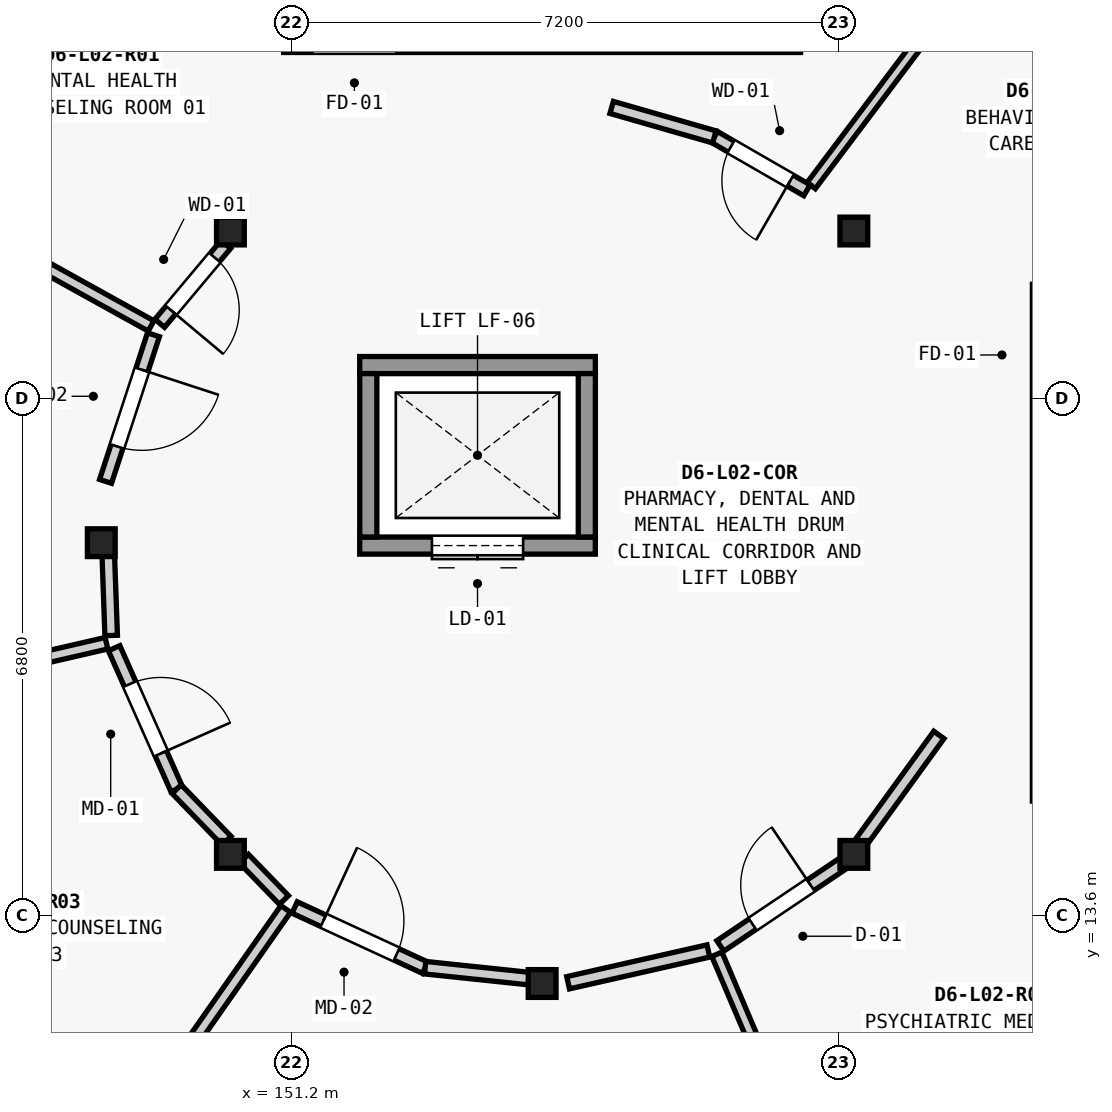
"""IFC4 building model, lengths in metres.
Left out: names, types, materials, properties, quantities, classifications, styles, units other than length and angle.
Written with IfcOpenShell. Run it as: python <this file> out.ifc"""

import sys

from ifc_helpers import new_model, si_unit, direction, frame, frame_2d, origin, origin_2d, place, context, subcontext, project, spatial, rectangle, extrude, element, fill, save


model = new_model("IFC4")
c1 = context("Model", 3, precision=1e-05, world=origin(), true_north=direction((0.0, 1.0)))
c2 = subcontext(c1, "Body", "Model", "MODEL_VIEW")
j1 = project(units=[si_unit("LENGTHUNIT", "METRE"), si_unit("PLANEANGLEUNIT", "RADIAN")], contexts=[c1])
p1 = place(None, origin())
s1 = spatial("IfcSite", under=j1, at=p1, CompositionType="ELEMENT")
p2 = place(p1, origin())
s2 = spatial("IfcBuilding", under=s1, at=p2, CompositionType="ELEMENT")
p3 = place(p2, frame((0.0, 0.0, 8.75)))
s3 = spatial("IfcBuildingStorey", under=s2, at=p3, CompositionType="ELEMENT", Elevation=8.75)
for number, where, z_axis, x_axis in (
    (1, (158.601, 22.601, 0.0), (0.0, 0.0, 1.0), (1.0, 0.0, 0.0)),
    (2, (150.399, 22.601, 0.0), (0.0, 0.0, 1.0), (1.0, 0.0, 0.0)),
    (3, (148.7, 18.5, 0.0), (0.0, 0.0, 1.0), (1.0, 0.0, 0.0)),
    (4, (150.399, 14.399, 0.0), (0.0, 0.0, 1.0), (1.0, 0.0, 0.0)),
    (5, (154.5, 12.7, 0.0), (0.0, 0.0, 1.0), (1.0, 0.0, 0.0)),
    (6, (158.601, 14.399, 0.0), (0.0, 0.0, 1.0), (1.0, 0.0, 0.0)),
):
    element("IfcColumn", number, at=place(p3, frame(where, z_axis=z_axis, x_axis=x_axis)), inside=s3, PredefinedType="COLUMN", context=c2, shape_type="SweptSolid", body=[
        extrude(rectangle(XDim=0.365, YDim=0.365, at=origin_2d()), origin(), (0.0, 0.0, 1.0), 4.2),
    ])
p4 = place(p3, frame((152.1, 18.462, 0.0), z_axis=(0.0, 0.0, 1.0), x_axis=(1.0, 0.0, 0.0)))
e7 = element("IfcWall", 7, at=p4, inside=s3, PredefinedType="SHEAR", context=c2, shape_type="SweptSolid", body=[
    extrude(rectangle(XDim=3.1, YDim=0.225, at=frame_2d((1.55, 0.0))), origin(), (0.0, 0.0, 1.0), 3.96),
])
p5 = place(p4, frame((0.95, 0.0, 0.0)))
e8 = element("IfcOpeningElement", 8, at=p5, cuts=e7, PredefinedType="OPENING", context=c2, shape_type="SweptSolid", body=[
    extrude(rectangle(XDim=1.2, YDim=2.2, at=frame_2d((0.6, 1.1))), frame((0.0, 0.123, 0.0), z_axis=(0.0, -1.0, 0.0), x_axis=(1.0, 0.0, 0.0)), (0.0, 0.0, 1.0), 0.245),
])
p6 = place(p3, frame((152.1, 20.837, 0.0), z_axis=(0.0, 0.0, 1.0), x_axis=(1.0, 0.0, 0.0)))
e9 = element("IfcWall", 9, at=p6, inside=s3, PredefinedType="SHEAR", context=c2, shape_type="SweptSolid", body=[
    extrude(rectangle(XDim=3.1, YDim=0.225, at=frame_2d((1.55, 0.0))), origin(), (0.0, 0.0, 1.0), 3.96),
])
for number, where, z_axis, x_axis in (
    (10, (152.213, 18.575, 0.0), (0.0, 0.0, 1.0), (0.0, 1.0, 0.0)),
    (11, (155.088, 18.575, 0.0), (0.0, 0.0, 1.0), (0.0, 1.0, 0.0)),
):
    element("IfcWall", number, at=place(p3, frame(where, z_axis=z_axis, x_axis=x_axis)), inside=s3, PredefinedType="SHEAR", context=c2, shape_type="SweptSolid", body=[
        extrude(rectangle(XDim=2.15, YDim=0.225, at=frame_2d((1.075, 0.0))), origin(), (0.0, 0.0, 1.0), 3.96),
    ])
p7 = place(p3, frame((149.355, 21.352, 0.0), z_axis=(0.0, 0.0, 1.0), x_axis=(-0.874634926541, 0.484782162703, 0.0)))
e12 = element("IfcWall", 12, at=p7, inside=s3, PredefinedType="PARTITIONING", context=c2, shape_type="SweptSolid", body=[
    extrude(rectangle(XDim=4.866, YDim=0.155, at=frame_2d((2.433, 0.0))), origin(), (0.0, 0.0, 1.0), 3.279),
])
p8 = place(p3, frame((148.768, 17.177, 0.0), z_axis=(0.0, 0.0, 1.0), x_axis=(-0.974350778181, -0.225034577472, 0.0)))
e13 = element("IfcWall", 13, at=p8, inside=s3, PredefinedType="PARTITIONING", context=c2, shape_type="SweptSolid", body=[
    extrude(rectangle(XDim=4.889, YDim=0.155, at=frame_2d((2.444, 0.0))), origin(), (0.0, 0.0, 1.0), 3.279),
])
p9 = place(p3, frame((151.126, 13.681, 0.0), z_axis=(0.0, 0.0, 1.0), x_axis=(-0.573579487823, -0.819149907617, 0.0)))
e14 = element("IfcWall", 14, at=p9, inside=s3, PredefinedType="PARTITIONING", context=c2, shape_type="SweptSolid", body=[
    extrude(rectangle(XDim=4.895, YDim=0.155, at=frame_2d((2.448, 0.0))), origin(), (0.0, 0.0, 1.0), 3.279),
])
p10 = place(p3, frame((156.799, 13.085, 0.0), z_axis=(0.0, 0.0, 1.0), x_axis=(0.390680175244, -0.920526480157, 0.0)))
e15 = element("IfcWall", 15, at=p10, inside=s3, PredefinedType="PARTITIONING", context=c2, shape_type="SweptSolid", body=[
    extrude(rectangle(XDim=4.907, YDim=0.145, at=frame_2d((2.453, 0.0))), origin(), (0.0, 0.0, 1.0), 3.279),
])
p11 = place(p3, frame((158.04, 23.198, 0.0), z_axis=(0.0, 0.0, 1.0), x_axis=(0.601809953338, 0.798639330401, 0.0)))
e16 = element("IfcWall", 16, at=p11, inside=s3, PredefinedType="PLUMBINGWALL", context=c2, shape_type="SweptSolid", body=[
    extrude(rectangle(XDim=4.873, YDim=0.135, at=frame_2d((2.437, 0.0))), origin(), (0.0, 0.0, 1.0), 3.279),
])
p12 = place(p3, frame((150.338, 22.424, 0.0), z_axis=(0.0, 0.0, 1.0), x_axis=(-0.64220553528, -0.766532484931, 0.0)))
e17 = element("IfcWall", 17, at=p12, inside=s3, PredefinedType="PARTITIONING", context=c2, shape_type="SweptSolid", body=[
    extrude(rectangle(XDim=1.353, YDim=0.165, at=frame_2d((0.677, 0.0))), origin(), (0.0, 0.0, 1.0), 3.279),
])
p13 = place(p12, frame((0.226, 0.0, 0.0)))
e18 = element("IfcOpeningElement", 18, at=p13, cuts=e17, PredefinedType="OPENING", context=c2, shape_type="SweptSolid", body=[
    extrude(rectangle(XDim=0.9, YDim=2.1, at=frame_2d((0.45, 1.05))), frame((0.0, 0.093, 0.0), z_axis=(0.0, -1.0, 0.0), x_axis=(1.0, 0.0, 0.0)), (0.0, 0.0, 1.0), 0.185),
])
p14 = place(p3, frame((149.386, 21.236, 0.0), z_axis=(0.0, 0.0, 1.0), x_axis=(-0.310375158833, -0.950614149263, 0.0)))
e19 = element("IfcWall", 19, at=p14, inside=s3, PredefinedType="PARTITIONING", context=c2, shape_type="SweptSolid", body=[
    extrude(rectangle(XDim=2.03, YDim=0.165, at=frame_2d((1.015, 0.0))), origin(), (0.0, 0.0, 1.0), 3.279),
])
p15 = place(p14, frame((0.485, 0.0, 0.0)))
e20 = element("IfcOpeningElement", 20, at=p15, cuts=e19, PredefinedType="OPENING", context=c2, shape_type="SweptSolid", body=[
    extrude(rectangle(XDim=1.06, YDim=2.2, at=frame_2d((0.53, 1.1))), frame((0.0, 0.093, 0.0), z_axis=(0.0, -1.0, 0.0), x_axis=(1.0, 0.0, 0.0)), (0.0, 0.0, 1.0), 0.185),
])
p16 = place(p3, frame((148.792, 18.337, 0.0), z_axis=(0.0, 0.0, 1.0), x_axis=(0.035979458719, -0.999352529666, 0.0)))
e21 = element("IfcWall", 21, at=p16, inside=s3, PredefinedType="PARTITIONING", context=c2, shape_type="SweptSolid", body=[
    extrude(rectangle(XDim=1.059, YDim=0.165, at=frame_2d((0.529, 0.0))), origin(), (0.0, 0.0, 1.0), 3.279),
])
p17 = place(p3, frame((148.869, 17.112, 0.0), z_axis=(0.0, 0.0, 1.0), x_axis=(0.40554678001, -0.914074290867, 0.0)))
e22 = element("IfcWall", 22, at=p17, inside=s3, PredefinedType="PARTITIONING", context=c2, shape_type="SweptSolid", body=[
    extrude(rectangle(XDim=2.029, YDim=0.165, at=frame_2d((1.015, 0.0))), origin(), (0.0, 0.0, 1.0), 3.279),
])
p18 = place(p17, frame((0.515, 0.0, 0.0)))
e23 = element("IfcOpeningElement", 23, at=p18, cuts=e22, PredefinedType="OPENING", context=c2, shape_type="SweptSolid", body=[
    extrude(rectangle(XDim=1.0, YDim=2.18, at=frame_2d((0.5, 1.09))), frame((0.0, 0.093, 0.0), z_axis=(0.0, -1.0, 0.0), x_axis=(1.0, 0.0, 0.0)), (0.0, 0.0, 1.0), 0.185),
])
p19 = place(p3, frame((149.692, 15.257, 0.0), z_axis=(0.0, 0.0, 1.0), x_axis=(0.695365384634, -0.718656372582, 0.0)))
e24 = element("IfcWall", 24, at=p19, inside=s3, PredefinedType="PARTITIONING", context=c2, shape_type="SweptSolid", body=[
    extrude(rectangle(XDim=0.943, YDim=0.165, at=frame_2d((0.472, 0.0))), origin(), (0.0, 0.0, 1.0), 3.279),
])
p20 = place(p3, frame((150.577, 14.342, 0.0), z_axis=(0.0, 0.0, 1.0), x_axis=(0.695878501673, -0.718159530265, 0.0)))
e25 = element("IfcWall", 25, at=p20, inside=s3, PredefinedType="PARTITIONING", context=c2, shape_type="SweptSolid", body=[
    extrude(rectangle(XDim=0.756, YDim=0.165, at=frame_2d((0.378, 0.0))), origin(), (0.0, 0.0, 1.0), 3.279),
])
p21 = place(p3, frame((151.244, 13.7, 0.0), z_axis=(0.0, 0.0, 1.0), x_axis=(0.908057612025, -0.418845285569, 0.0)))
e26 = element("IfcWall", 26, at=p21, inside=s3, PredefinedType="PARTITIONING", context=c2, shape_type="SweptSolid", body=[
    extrude(rectangle(XDim=1.891, YDim=0.165, at=frame_2d((0.945, 0.0))), origin(), (0.0, 0.0, 1.0), 3.279),
])
p22 = place(p21, frame((0.416, 0.0, 0.0)))
e27 = element("IfcOpeningElement", 27, at=p22, cuts=e26, PredefinedType="OPENING", context=c2, shape_type="SweptSolid", body=[
    extrude(rectangle(XDim=1.06, YDim=2.2, at=frame_2d((0.53, 1.1))), frame((0.0, 0.093, 0.0), z_axis=(0.0, -1.0, 0.0), x_axis=(1.0, 0.0, 0.0)), (0.0, 0.0, 1.0), 0.185),
])
p23 = place(p3, frame((152.961, 12.908, 0.0), z_axis=(0.0, 0.0, 1.0), x_axis=(0.994536643564, -0.104388048205, 0.0)))
e28 = element("IfcWall", 28, at=p23, inside=s3, PredefinedType="PARTITIONING", context=c2, shape_type="SweptSolid", body=[
    extrude(rectangle(XDim=1.371, YDim=0.165, at=frame_2d((0.685, 0.0))), origin(), (0.0, 0.0, 1.0), 3.279),
])
p24 = place(p3, frame((154.842, 12.71, 0.0), z_axis=(0.0, 0.0, 1.0), x_axis=(0.975286020369, 0.220946098567, 0.0)))
e29 = element("IfcWall", 29, at=p24, inside=s3, PredefinedType="PARTITIONING", context=c2, shape_type="SweptSolid", body=[
    extrude(rectangle(XDim=1.892, YDim=0.165, at=frame_2d((0.946, 0.0))), origin(), (0.0, 0.0, 1.0), 3.279),
])
p25 = place(p3, frame((156.845, 13.195, 0.0), z_axis=(0.0, 0.0, 1.0), x_axis=(0.829839559262, 0.558002066201, 0.0)))
e30 = element("IfcWall", 30, at=p25, inside=s3, PredefinedType="PARTITIONING", context=c2, shape_type="SweptSolid", body=[
    extrude(rectangle(XDim=1.943, YDim=0.165, at=frame_2d((0.971, 0.0))), origin(), (0.0, 0.0, 1.0), 3.279),
])
p26 = place(p25, frame((0.511, 0.0, 0.0)))
e31 = element("IfcOpeningElement", 31, at=p26, cuts=e30, PredefinedType="OPENING", context=c2, shape_type="SweptSolid", body=[
    extrude(rectangle(XDim=0.92, YDim=2.12, at=frame_2d((0.46, 1.06))), frame((0.0, 0.093, 0.0), z_axis=(0.0, -1.0, 0.0), x_axis=(1.0, 0.0, 0.0)), (0.0, 0.0, 1.0), 0.185),
])
p27 = place(p3, frame((158.697, 14.56, 0.0), z_axis=(0.0, 0.0, 1.0), x_axis=(0.586988232211, 0.809595463949, 0.0)))
e32 = element("IfcWall", 32, at=p27, inside=s3, PredefinedType="PARTITIONING", context=c2, shape_type="SweptSolid", body=[
    extrude(rectangle(XDim=1.743, YDim=0.165, at=frame_2d((0.871, 0.0))), origin(), (0.0, 0.0, 1.0), 3.279),
])
p28 = place(p3, frame((157.984, 23.137, 0.0), z_axis=(0.0, 0.0, 1.0), x_axis=(-0.866312781502, 0.499501916519, 0.0)))
e33 = element("IfcWall", 33, at=p28, inside=s3, PredefinedType="PARTITIONING", context=c2, shape_type="SweptSolid", body=[
    extrude(rectangle(XDim=1.406, YDim=0.165, at=frame_2d((0.703, 0.0))), origin(), (0.0, 0.0, 1.0), 3.279),
])
p29 = place(p28, frame((0.253, 0.0, 0.0)))
e34 = element("IfcOpeningElement", 34, at=p29, cuts=e33, PredefinedType="OPENING", context=c2, shape_type="SweptSolid", body=[
    extrude(rectangle(XDim=0.9, YDim=2.1, at=frame_2d((0.45, 1.05))), frame((0.0, 0.093, 0.0), z_axis=(0.0, -1.0, 0.0), x_axis=(1.0, 0.0, 0.0)), (0.0, 0.0, 1.0), 0.185),
])
p30 = place(p3, frame((156.766, 23.839, 0.0), z_axis=(0.0, 0.0, 1.0), x_axis=(-0.961162645401, 0.27598255214, 0.0)))
e35 = element("IfcWall", 35, at=p30, inside=s3, PredefinedType="PARTITIONING", context=c2, shape_type="SweptSolid", body=[
    extrude(rectangle(XDim=1.406, YDim=0.165, at=frame_2d((0.703, 0.0))), origin(), (0.0, 0.0, 1.0), 3.279),
])
p31 = place(p5, origin())
e36 = element("IfcDoor", 36, at=p31, inside=s3, OperationType="DOUBLE_DOOR_SLIDING", PredefinedType="DOOR", context=c2, shape_type="SweptSolid", body=[
    extrude(rectangle(XDim=1.2, YDim=2.2, at=frame_2d((0.6, 1.1))), frame((0.0, 0.025, 0.0), z_axis=(0.0, -1.0, 0.0), x_axis=(1.0, 0.0, 0.0)), (0.0, 0.0, 1.0), 0.05),
])
fill(e8, e36)
p32 = place(p13, origin())
e37 = element("IfcDoor", 37, at=p32, inside=s3, OperationType="SINGLE_SWING_RIGHT", PredefinedType="DOOR", context=c2, shape_type="SweptSolid", body=[
    extrude(rectangle(XDim=0.9, YDim=2.1, at=frame_2d((0.45, 1.05))), frame((0.0, 0.025, 0.0), z_axis=(0.0, -1.0, 0.0), x_axis=(1.0, 0.0, 0.0)), (0.0, 0.0, 1.0), 0.05),
])
fill(e18, e37)
p33 = place(p15, origin())
e38 = element("IfcDoor", 38, at=p33, inside=s3, OperationType="SINGLE_SWING_LEFT", PredefinedType="DOOR", context=c2, shape_type="SweptSolid", body=[
    extrude(rectangle(XDim=1.06, YDim=2.2, at=frame_2d((0.53, 1.1))), frame((0.0, 0.025, 0.0), z_axis=(0.0, -1.0, 0.0), x_axis=(1.0, 0.0, 0.0)), (0.0, 0.0, 1.0), 0.05),
])
fill(e20, e38)
p34 = place(p18, origin())
e39 = element("IfcDoor", 39, at=p34, inside=s3, OperationType="SINGLE_SWING_RIGHT", PredefinedType="DOOR", context=c2, shape_type="SweptSolid", body=[
    extrude(rectangle(XDim=1.0, YDim=2.18, at=frame_2d((0.5, 1.09))), frame((0.0, 0.025, 0.0), z_axis=(0.0, -1.0, 0.0), x_axis=(1.0, 0.0, 0.0)), (0.0, 0.0, 1.0), 0.05),
])
fill(e23, e39)
p35 = place(p22, origin())
e40 = element("IfcDoor", 40, at=p35, inside=s3, OperationType="SINGLE_SWING_LEFT", PredefinedType="DOOR", context=c2, shape_type="SweptSolid", body=[
    extrude(rectangle(XDim=1.06, YDim=2.2, at=frame_2d((0.53, 1.1))), frame((0.0, 0.025, 0.0), z_axis=(0.0, -1.0, 0.0), x_axis=(1.0, 0.0, 0.0)), (0.0, 0.0, 1.0), 0.05),
])
fill(e27, e40)
p36 = place(p26, origin())
e41 = element("IfcDoor", 41, at=p36, inside=s3, OperationType="SINGLE_SWING_RIGHT", PredefinedType="DOOR", context=c2, shape_type="SweptSolid", body=[
    extrude(rectangle(XDim=0.92, YDim=2.12, at=frame_2d((0.46, 1.06))), frame((0.0, 0.025, 0.0), z_axis=(0.0, -1.0, 0.0), x_axis=(1.0, 0.0, 0.0)), (0.0, 0.0, 1.0), 0.05),
])
fill(e31, e41)
p37 = place(p29, origin())
e42 = element("IfcDoor", 42, at=p37, inside=s3, OperationType="SINGLE_SWING_LEFT", PredefinedType="DOOR", context=c2, shape_type="SweptSolid", body=[
    extrude(rectangle(XDim=0.9, YDim=2.1, at=frame_2d((0.45, 1.05))), frame((0.0, 0.025, 0.0), z_axis=(0.0, -1.0, 0.0), x_axis=(1.0, 0.0, 0.0)), (0.0, 0.0, 1.0), 0.05),
])
fill(e34, e42)
save(model, sys.argv[1])
